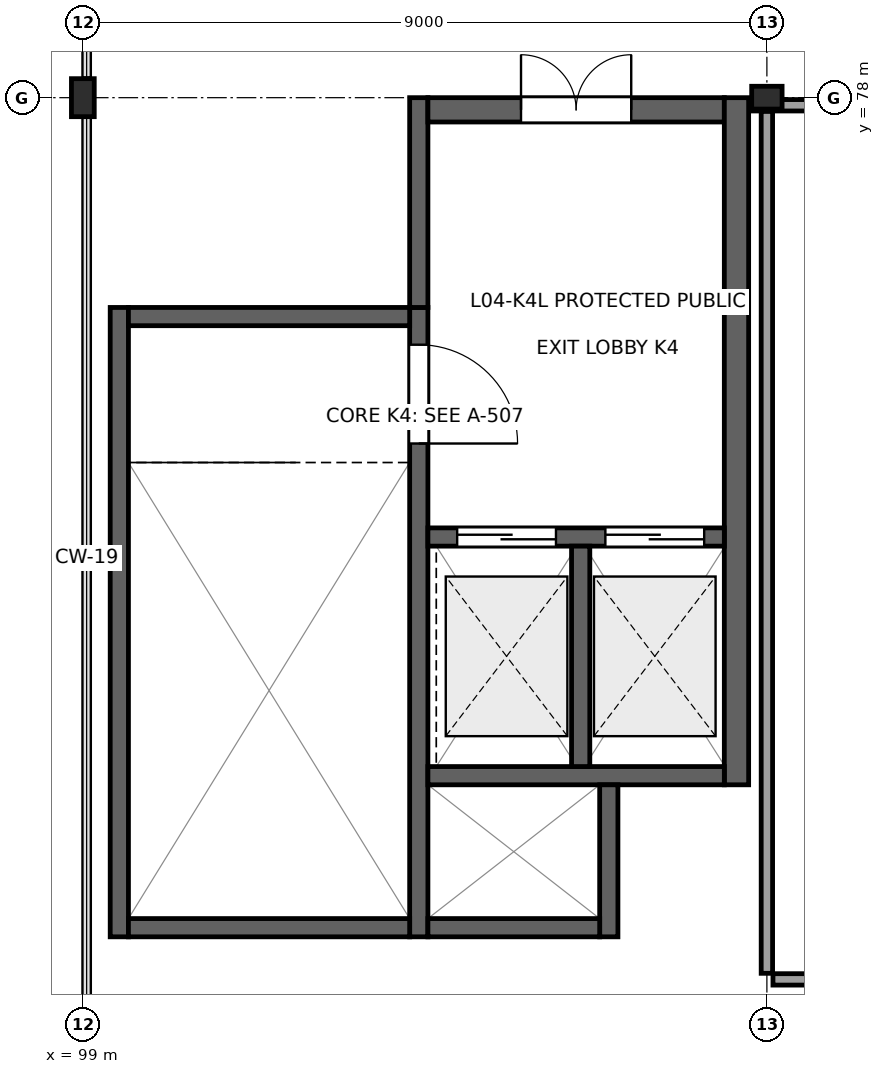
"""IFC4 building model, lengths in metres.
Left out: names, types, materials, properties, quantities, classifications, styles, units other than length and angle.
Written with IfcOpenShell. Run it as: python <this file> out.ifc"""

import sys

from ifc_helpers import new_model, si_unit, direction, frame, frame_2d, origin, origin_2d, place, context, subcontext, project, spatial, rectangle, i_section, extrude, element, fill, save


model = new_model("IFC4")
c1 = context("Model", 3, precision=1e-05, world=origin(), true_north=direction((0.0, 1.0)))
c2 = subcontext(c1, "Body", "Model", "MODEL_VIEW")
j1 = project(units=[si_unit("LENGTHUNIT", "METRE"), si_unit("PLANEANGLEUNIT", "RADIAN")], contexts=[c1])
p1 = place(None, origin())
s1 = spatial("IfcSite", under=j1, at=p1, CompositionType="ELEMENT")
p2 = place(p1, origin())
s2 = spatial("IfcBuilding", under=s1, at=p2, CompositionType="ELEMENT")
p3 = place(p2, frame((0.0, 0.0, 18.9)))
s3 = spatial("IfcBuildingStorey", under=s2, at=p3, CompositionType="ELEMENT", Elevation=18.9)
p4 = place(p3, frame((99.0, 78.0, 0.0), z_axis=(0.0, 0.0, 1.0), x_axis=(1.0, 0.0, 0.0)))
e1 = element("IfcColumn", 1, at=p4, inside=s3, PredefinedType="COLUMN", context=c2, shape_type="SweptSolid", body=[
    extrude(i_section(OverallWidth=0.3, OverallDepth=0.5, WebThickness=0.014, FlangeThickness=0.028, at=origin_2d()), origin(), (0.0, 0.0, 1.0), 4.3),
])
p5 = place(p3, frame((108.0, 78.0, 0.0), z_axis=(0.0, 0.0, 1.0), x_axis=(0.0, 1.0, 0.0)))
e2 = element("IfcColumn", 2, at=p5, inside=s3, PredefinedType="COLUMN", context=c2, shape_type="SweptSolid", body=[
    extrude(i_section(OverallWidth=0.3, OverallDepth=0.4, WebThickness=0.013, FlangeThickness=0.024, at=origin_2d()), origin(), (0.0, 0.0, 1.0), 4.3),
])
p6 = place(p3, frame((99.48, 66.96, 0.0), z_axis=(0.0, 0.0, 1.0), x_axis=(0.0, 1.0, 0.0)))
e3 = element("IfcWall", 3, at=p6, inside=s3, PredefinedType="SHEAR", context=c2, shape_type="SweptSolid", body=[
    extrude(rectangle(XDim=8.28, YDim=0.24, at=frame_2d((4.14, 0.0))), origin(), (0.0, 0.0, 1.0), 4.31),
])
p7 = place(p3, frame((103.42, 66.96, 0.0), z_axis=(0.0, 0.0, 1.0), x_axis=(0.0, 1.0, 0.0)))
e4 = element("IfcWall", 4, at=p7, inside=s3, PredefinedType="SHEAR", context=c2, shape_type="SweptSolid", body=[
    extrude(rectangle(XDim=8.28, YDim=0.24, at=frame_2d((4.14, 0.0))), origin(), (0.0, 0.0, 1.0), 4.31),
])
p8 = place(p7, frame((6.49, 0.0, 0.0)))
e5 = element("IfcOpeningElement", 5, at=p8, cuts=e4, PredefinedType="OPENING", context=c2, shape_type="SweptSolid", body=[
    extrude(rectangle(XDim=1.3, YDim=2.2, at=frame_2d((0.65, 1.1))), frame((0.0, 0.135, 0.0), z_axis=(0.0, -1.0, 0.0), x_axis=(1.0, 0.0, 0.0)), (0.0, 0.0, 1.0), 0.27),
])
for number, where, z_axis, x_axis in (
    (6, (99.6, 67.08, 0.0), (0.0, 0.0, 1.0), (1.0, 0.0, 0.0)),
    (7, (99.6, 75.12, 0.0), (0.0, 0.0, 1.0), (1.0, 0.0, 0.0)),
):
    element("IfcWall", number, at=place(p3, frame(where, z_axis=z_axis, x_axis=x_axis)), inside=s3, PredefinedType="SHEAR", context=c2, shape_type="SweptSolid", body=[
        extrude(rectangle(XDim=3.7, YDim=0.24, at=frame_2d((1.85, 0.0))), origin(), (0.0, 0.0, 1.0), 4.31),
    ])
p9 = place(p3, frame((103.42, 75.24, 0.0), z_axis=(0.0, 0.0, 1.0), x_axis=(0.0, 1.0, 0.0)))
e8 = element("IfcWall", 8, at=p9, inside=s3, PredefinedType="SHEAR", context=c2, shape_type="SweptSolid", body=[
    extrude(rectangle(XDim=2.76, YDim=0.24, at=frame_2d((1.38, 0.0))), origin(), (0.0, 0.0, 1.0), 4.16),
])
p10 = place(p3, frame((103.54, 77.84, 0.0), z_axis=(0.0, 0.0, 1.0), x_axis=(1.0, 0.0, 0.0)))
e9 = element("IfcWall", 9, at=p10, inside=s3, PredefinedType="SHEAR", context=c2, shape_type="SweptSolid", body=[
    extrude(rectangle(XDim=3.9, YDim=0.32, at=frame_2d((1.95, 0.0))), origin(), (0.0, 0.0, 1.0), 4.16),
])
p11 = place(p10, frame((1.225, 0.0, 0.0)))
e10 = element("IfcOpeningElement", 10, at=p11, cuts=e9, PredefinedType="OPENING", context=c2, shape_type="SweptSolid", body=[
    extrude(rectangle(XDim=1.45, YDim=2.2, at=frame_2d((0.725, 1.1))), frame((0.0, 0.175, 0.0), z_axis=(0.0, -1.0, 0.0), x_axis=(1.0, 0.0, 0.0)), (0.0, 0.0, 1.0), 0.35),
])
p12 = place(p3, frame((107.6, 68.96, 0.0), z_axis=(0.0, 0.0, 1.0), x_axis=(0.0, 1.0, 0.0)))
e11 = element("IfcWall", 11, at=p12, inside=s3, PredefinedType="SHEAR", context=c2, shape_type="SweptSolid", body=[
    extrude(rectangle(XDim=9.04, YDim=0.32, at=frame_2d((4.52, 0.0))), origin(), (0.0, 0.0, 1.0), 4.16),
])
p13 = place(p3, frame((103.54, 72.22, 0.0), z_axis=(0.0, 0.0, 1.0), x_axis=(1.0, 0.0, 0.0)))
e12 = element("IfcWall", 12, at=p13, inside=s3, PredefinedType="SHEAR", context=c2, shape_type="SweptSolid", body=[
    extrude(rectangle(XDim=3.9, YDim=0.24, at=frame_2d((1.95, 0.0))), origin(), (0.0, 0.0, 1.0), 4.31),
])
p14 = place(p13, frame((0.385, 0.0, 0.0)))
e13 = element("IfcOpeningElement", 13, at=p14, cuts=e12, PredefinedType="OPENING", context=c2, shape_type="SweptSolid", body=[
    extrude(rectangle(XDim=1.3, YDim=2.2, at=frame_2d((0.65, 1.1))), frame((0.0, 0.135, 0.0), z_axis=(0.0, -1.0, 0.0), x_axis=(1.0, 0.0, 0.0)), (0.0, 0.0, 1.0), 0.27),
])
p15 = place(p13, frame((2.335, 0.0, 0.0)))
e14 = element("IfcOpeningElement", 14, at=p15, cuts=e12, PredefinedType="OPENING", context=c2, shape_type="SweptSolid", body=[
    extrude(rectangle(XDim=1.3, YDim=2.2, at=frame_2d((0.65, 1.1))), frame((0.0, 0.135, 0.0), z_axis=(0.0, -1.0, 0.0), x_axis=(1.0, 0.0, 0.0)), (0.0, 0.0, 1.0), 0.27),
])
p16 = place(p3, frame((103.54, 69.08, 0.0), z_axis=(0.0, 0.0, 1.0), x_axis=(1.0, 0.0, 0.0)))
e15 = element("IfcWall", 15, at=p16, inside=s3, PredefinedType="SHEAR", context=c2, shape_type="SweptSolid", body=[
    extrude(rectangle(XDim=3.9, YDim=0.24, at=frame_2d((1.95, 0.0))), origin(), (0.0, 0.0, 1.0), 4.31),
])
p17 = place(p3, frame((105.55, 69.2, 0.0), z_axis=(0.0, 0.0, 1.0), x_axis=(0.0, 1.0, 0.0)))
e16 = element("IfcWall", 16, at=p17, inside=s3, PredefinedType="SHEAR", context=c2, shape_type="SweptSolid", body=[
    extrude(rectangle(XDim=2.9, YDim=0.24, at=frame_2d((1.45, 0.0))), origin(), (0.0, 0.0, 1.0), 4.31),
])
p18 = place(p3, frame((105.92, 66.96, 0.0), z_axis=(0.0, 0.0, 1.0), x_axis=(0.0, 1.0, 0.0)))
e17 = element("IfcWall", 17, at=p18, inside=s3, PredefinedType="SHEAR", context=c2, shape_type="SweptSolid", body=[
    extrude(rectangle(XDim=2.0, YDim=0.24, at=frame_2d((1.0, 0.0))), origin(), (0.0, 0.0, 1.0), 4.31),
])
p19 = place(p3, frame((103.54, 67.08, 0.0), z_axis=(0.0, 0.0, 1.0), x_axis=(1.0, 0.0, 0.0)))
e18 = element("IfcWall", 18, at=p19, inside=s3, PredefinedType="SHEAR", context=c2, shape_type="SweptSolid", body=[
    extrude(rectangle(XDim=2.26, YDim=0.24, at=frame_2d((1.13, 0.0))), origin(), (0.0, 0.0, 1.0), 4.31),
])
p20 = place(p3, frame((125.43, 66.4, 0.0), z_axis=(0.0, 0.0, 1.0), x_axis=(-1.0, 0.0, 0.0)))
e19 = element("IfcWall", 19, at=p20, inside=s3, PredefinedType="PARTITIONING", context=c2, shape_type="SweptSolid", body=[
    extrude(rectangle(XDim=17.35, YDim=0.15, at=frame_2d((8.675, 0.0))), origin(), (0.0, 0.0, 1.0), 4.14),
])
p21 = place(p3, frame((108.0, 66.48, 0.0), z_axis=(0.0, 0.0, 1.0), x_axis=(0.0, 1.0, 0.0)))
e20 = element("IfcWall", 20, at=p21, inside=s3, PredefinedType="PARTITIONING", context=c2, shape_type="SweptSolid", body=[
    extrude(rectangle(XDim=11.34, YDim=0.15, at=frame_2d((5.67, 0.0))), origin(), (0.0, 0.0, 1.0), 3.695),
])
p22 = place(p3, frame((107.798, 77.9, 0.0), z_axis=(0.0, 0.0, 1.0), x_axis=(1.0, 0.0, 0.0)))
e21 = element("IfcWall", 21, at=p22, inside=s3, PredefinedType="PARTITIONING", context=c2, shape_type="SweptSolid", body=[
    extrude(rectangle(XDim=17.622, YDim=0.15, at=frame_2d((8.811, 0.0))), origin(), (0.0, 0.0, 1.0), 3.705),
])
p23 = place(p22, frame((7.581, 0.0, 0.0)))
e22 = element("IfcOpeningElement", 22, at=p23, cuts=e21, PredefinedType="OPENING", context=c2, shape_type="SweptSolid", body=[
    extrude(rectangle(XDim=1.05, YDim=2.25, at=frame_2d((0.525, 1.125))), frame((0.0, 0.09, 0.0), z_axis=(0.0, -1.0, 0.0), x_axis=(1.0, 0.0, 0.0)), (0.0, 0.0, 1.0), 0.18),
])
p24 = place(p8, frame((1.3, 0.0, 0.0), z_axis=(0.0, 0.0, 1.0), x_axis=(-1.0, 0.0, 0.0)))
e23 = element("IfcDoor", 23, at=p24, inside=s3, OperationType="SINGLE_SWING_LEFT", PredefinedType="DOOR", context=c2, shape_type="SweptSolid", body=[
    extrude(rectangle(XDim=1.3, YDim=2.2, at=frame_2d((0.65, 1.1))), frame((0.0, 0.025, 0.0), z_axis=(0.0, -1.0, 0.0), x_axis=(1.0, 0.0, 0.0)), (0.0, 0.0, 1.0), 0.05),
])
fill(e5, e23)
p25 = place(p11, origin())
e24 = element("IfcDoor", 24, at=p25, inside=s3, OperationType="DOUBLE_DOOR_SINGLE_SWING", PredefinedType="DOOR", context=c2, shape_type="SweptSolid", body=[
    extrude(rectangle(XDim=1.45, YDim=2.2, at=frame_2d((0.725, 1.1))), frame((0.0, 0.025, 0.0), z_axis=(0.0, -1.0, 0.0), x_axis=(1.0, 0.0, 0.0)), (0.0, 0.0, 1.0), 0.05),
])
fill(e10, e24)
p26 = place(p14, origin())
e25 = element("IfcDoor", 25, at=p26, inside=s3, OperationType="DOUBLE_DOOR_SLIDING", PredefinedType="DOOR", context=c2, shape_type="SweptSolid", body=[
    extrude(rectangle(XDim=1.3, YDim=2.2, at=frame_2d((0.65, 1.1))), frame((0.0, 0.025, 0.0), z_axis=(0.0, -1.0, 0.0), x_axis=(1.0, 0.0, 0.0)), (0.0, 0.0, 1.0), 0.05),
])
fill(e13, e25)
p27 = place(p15, origin())
e26 = element("IfcDoor", 26, at=p27, inside=s3, OperationType="DOUBLE_DOOR_SLIDING", PredefinedType="DOOR", context=c2, shape_type="SweptSolid", body=[
    extrude(rectangle(XDim=1.3, YDim=2.2, at=frame_2d((0.65, 1.1))), frame((0.0, 0.025, 0.0), z_axis=(0.0, -1.0, 0.0), x_axis=(1.0, 0.0, 0.0)), (0.0, 0.0, 1.0), 0.05),
])
fill(e14, e26)
save(model, sys.argv[1])
